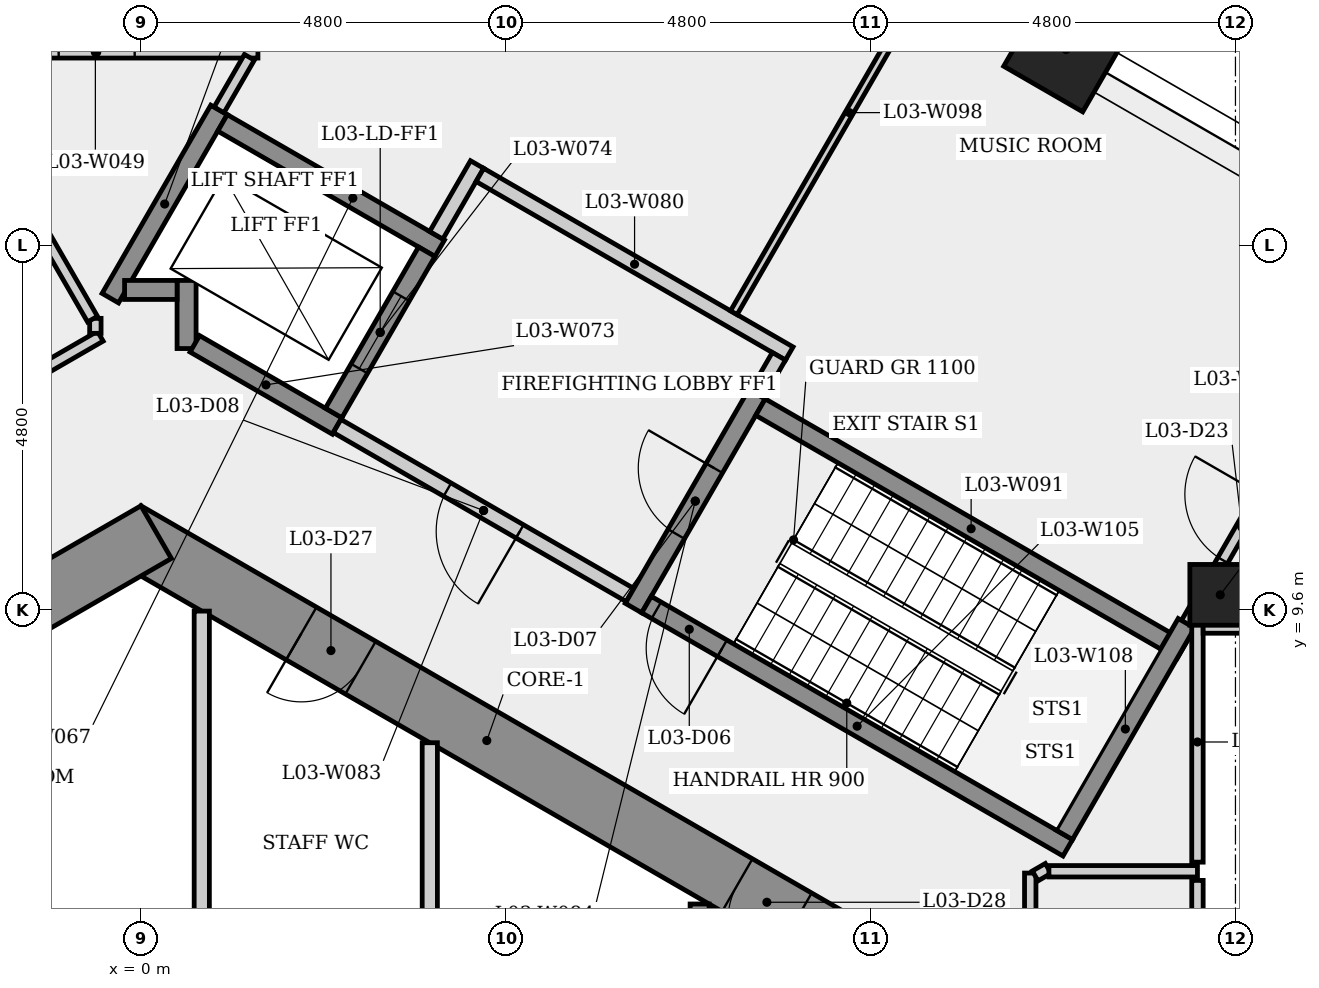
"""IFC4 building model, lengths in metres.
Left out: names, types, materials, properties, quantities, classifications, styles, units other than length and angle.
Written with IfcOpenShell. Run it as: python <this file> out.ifc"""

import sys

from ifc_helpers import new_model, si_unit, direction, frame, frame_2d, origin, origin_2d, place, context, subcontext, project, spatial, rectangle, extrude, element, fill, save


model = new_model("IFC4")
c1 = context("Model", 3, precision=1e-05, world=origin(), true_north=direction((0.0, 1.0)))
c2 = subcontext(c1, "Body", "Model", "MODEL_VIEW")
j1 = project(units=[si_unit("LENGTHUNIT", "METRE"), si_unit("PLANEANGLEUNIT", "RADIAN")], contexts=[c1])
p1 = place(None, origin())
s1 = spatial("IfcSite", under=j1, at=p1, CompositionType="ELEMENT")
p2 = place(p1, origin())
s2 = spatial("IfcBuilding", under=s1, at=p2, CompositionType="ELEMENT")
p3 = place(p2, frame((0.0, 0.0, 16.0)))
s3 = spatial("IfcBuildingStorey", under=s2, at=p3, CompositionType="ELEMENT", Elevation=16.0)
p4 = place(p3, frame((9.3, 5.138, 0.0), z_axis=(0.0, 0.0, 1.0), x_axis=(-0.866023993627, 0.500002442456, 0.0)))
e1 = element("IfcWall", 1, at=p4, inside=s3, PredefinedType="SHEAR", context=c2, shape_type="SweptSolid", body=[
    extrude(rectangle(XDim=10.97, YDim=0.8, at=frame_2d((5.485, 0.0))), origin(), (0.0, 0.0, 1.0), 4.5),
])
p5 = place(p4, frame((7.403, 0.0, 0.0)))
e2 = element("IfcOpeningElement", 2, at=p5, cuts=e1, PredefinedType="OPENING", context=c2, shape_type="SweptSolid", body=[
    extrude(rectangle(XDim=0.9, YDim=2.1, at=frame_2d((0.45, 1.05))), frame((0.0, 0.41, 0.0), z_axis=(0.0, -1.0, 0.0), x_axis=(1.0, 0.0, 0.0)), (0.0, 0.0, 1.0), 0.82),
])
p6 = place(p4, frame((0.78, 0.0, 0.0)))
e3 = element("IfcOpeningElement", 3, at=p6, cuts=e1, PredefinedType="OPENING", context=c2, shape_type="SweptSolid", body=[
    extrude(rectangle(XDim=0.9, YDim=2.1, at=frame_2d((0.45, 1.05))), frame((0.0, 0.41, 0.0), z_axis=(0.0, -1.0, 0.0), x_axis=(1.0, 0.0, 0.0)), (0.0, 0.0, 1.0), 0.82),
])
p7 = place(p3, frame((0.2, 10.623, 0.0), z_axis=(0.0, 0.0, 1.0), x_axis=(-0.866023993627, -0.500002442456, 0.0)))
e4 = element("IfcWall", 4, at=p7, inside=s3, PredefinedType="SHEAR", context=c2, shape_type="SweptSolid", body=[
    extrude(rectangle(XDim=10.97, YDim=0.8, at=frame_2d((5.485, 0.0))), origin(), (0.0, 0.0, 1.0), 4.5),
])
p8 = place(p7, frame((6.185, 0.0, 0.0)))
e5 = element("IfcOpeningElement", 5, at=p8, cuts=e4, PredefinedType="OPENING", context=c2, shape_type="SweptSolid", body=[
    extrude(rectangle(XDim=0.9, YDim=2.1, at=frame_2d((0.45, 1.05))), frame((0.0, 0.41, 0.0), z_axis=(0.0, -1.0, 0.0), x_axis=(1.0, 0.0, 0.0)), (0.0, 0.0, 1.0), 0.82),
])
p9 = place(p3, frame((12.171, 16.973, 0.0), z_axis=(0.0, 0.0, 1.0), x_axis=(0.5, 0.866025403784, 0.0)))
e6 = element("IfcColumn", 6, at=p9, inside=s3, PredefinedType="COLUMN", context=c2, shape_type="SweptSolid", body=[
    extrude(rectangle(XDim=1.2, YDim=1.2, at=origin_2d()), origin(), (0.0, 0.0, 1.0), 4.5),
])
p10 = place(p3, frame((14.2, 9.798, 0.0), z_axis=(0.0, 0.0, 1.0), x_axis=(1.0, 0.0, 0.0)))
e7 = element("IfcColumn", 7, at=p10, inside=s3, PredefinedType="COLUMN", context=c2, shape_type="SweptSolid", body=[
    extrude(rectangle(XDim=0.8, YDim=0.8, at=origin_2d()), origin(), (0.0, 0.0, 1.0), 4.05),
])
p11 = place(p3, frame((-10.598, 7.391, 0.0), z_axis=(0.0, 0.0, 1.0), x_axis=(0.866022183431, 0.500005577774, 0.0)))
e8 = element("IfcWall", 8, at=p11, inside=s3, PredefinedType="PARTITIONING", context=c2, shape_type="SweptSolid", body=[
    extrude(rectangle(XDim=11.619, YDim=0.15, at=frame_2d((5.81, 0.0))), origin(), (0.0, 0.0, 1.0), 4.05),
])
p12 = place(p11, frame((5.272, 0.0, 0.0)))
e9 = element("IfcOpeningElement", 9, at=p12, cuts=e8, PredefinedType="OPENING", context=c2, shape_type="SweptSolid", body=[
    extrude(rectangle(XDim=1.0, YDim=2.1, at=frame_2d((0.5, 1.05))), frame((0.0, 0.085, 0.0), z_axis=(0.0, -1.0, 0.0), x_axis=(1.0, 0.0, 0.0)), (0.0, 0.0, 1.0), 0.17),
])
p13 = place(p3, frame((-2.739, 16.936, 0.0), z_axis=(0.0, 0.0, 1.0), x_axis=(1.0, 0.0, 0.0)))
e10 = element("IfcWall", 10, at=p13, inside=s3, PredefinedType="PARTITIONING", context=c2, shape_type="SweptSolid", body=[
    extrude(rectangle(XDim=4.278, YDim=0.15, at=frame_2d((2.139, 0.0))), origin(), (0.0, 0.0, 1.0), 4.05),
])
p14 = place(p13, frame((1.656, 0.0, 0.0)))
e11 = element("IfcOpeningElement", 11, at=p14, cuts=e10, PredefinedType="OPENING", context=c2, shape_type="SweptSolid", body=[
    extrude(rectangle(XDim=1.0, YDim=2.1, at=frame_2d((0.5, 1.05))), frame((0.0, 0.085, 0.0), z_axis=(0.0, -1.0, 0.0), x_axis=(1.0, 0.0, 0.0)), (0.0, 0.0, 1.0), 0.17),
])
p15 = place(p3, frame((-0.6, 13.239, 0.0), z_axis=(0.0, 0.0, 1.0), x_axis=(0.0, 1.0, 0.0)))
e12 = element("IfcWall", 12, at=p15, inside=s3, PredefinedType="PARTITIONING", context=c2, shape_type="SweptSolid", body=[
    extrude(rectangle(XDim=0.197, YDim=0.15, at=frame_2d((0.099, 0.0))), origin(), (0.0, 0.0, 1.0), 4.05),
])
p16 = place(p3, frame((-0.637, 13.426, 0.0), z_axis=(0.0, 0.0, 1.0), x_axis=(-0.500046503579, 0.865998553266, 0.0)))
e13 = element("IfcWall", 13, at=p16, inside=s3, PredefinedType="PARTITIONING", context=c2, shape_type="SweptSolid", body=[
    extrude(rectangle(XDim=3.978, YDim=0.15, at=frame_2d((1.989, 0.0))), origin(), (0.0, 0.0, 1.0), 4.05),
])
p17 = place(p3, frame((-0.403, 13.702, 0.0), z_axis=(0.0, 0.0, 1.0), x_axis=(0.499976111731, 0.866039195244, 0.0)))
e14 = element("IfcWall", 14, at=p17, inside=s3, PredefinedType="SHEAR", context=c2, shape_type="SweptSolid", body=[
    extrude(rectangle(XDim=2.861, YDim=0.25, at=frame_2d((1.43, 0.0))), origin(), (0.0, 0.0, 1.0), 4.05),
])
p18 = place(p3, frame((0.6, 13.039, 0.0), z_axis=(0.0, 0.0, 1.0), x_axis=(0.0, 1.0, 0.0)))
e15 = element("IfcWall", 15, at=p18, inside=s3, PredefinedType="SHEAR", context=c2, shape_type="SweptSolid", body=[
    extrude(rectangle(XDim=0.896, YDim=0.25, at=frame_2d((0.448, 0.0))), origin(), (0.0, 0.0, 1.0), 4.05),
])
p19 = place(p3, frame((0.475, 13.81, 0.0), z_axis=(0.0, 0.0, 1.0), x_axis=(-1.0, 0.0, 0.0)))
e16 = element("IfcWall", 16, at=p19, inside=s3, PredefinedType="SHEAR", context=c2, shape_type="SweptSolid", body=[
    extrude(rectangle(XDim=0.691, YDim=0.25, at=frame_2d((0.345, 0.0))), origin(), (0.0, 0.0, 1.0), 4.5),
])
p20 = place(p3, frame((0.8, 9.584, 0.0), z_axis=(0.0, 0.0, 1.0), x_axis=(0.0, -1.0, 0.0)))
e17 = element("IfcWall", 17, at=p20, inside=s3, PredefinedType="PARTITIONING", context=c2, shape_type="SweptSolid", body=[
    extrude(rectangle(XDim=4.309, YDim=0.2, at=frame_2d((2.155, 0.0))), origin(), (0.0, 0.0, 1.0), 4.05),
])
p21 = place(p3, frame((1.073, 16.008, 0.0), z_axis=(0.0, 0.0, 1.0), x_axis=(0.866040211805, -0.499974350878, 0.0)))
e18 = element("IfcWall", 18, at=p21, inside=s3, PredefinedType="SHEAR", context=c2, shape_type="SweptSolid", body=[
    extrude(rectangle(XDim=3.3, YDim=0.25, at=frame_2d((1.65, 0.0))), origin(), (0.0, 0.0, 1.0), 4.05),
])
p22 = place(p3, frame((1.427, 16.871, 0.0), z_axis=(0.0, 0.0, 1.0), x_axis=(-0.499951716245, -0.866053278629, 0.0)))
e19 = element("IfcWall", 19, at=p22, inside=s3, PredefinedType="PARTITIONING", context=c2, shape_type="SweptSolid", body=[
    extrude(rectangle(XDim=0.799, YDim=0.15, at=frame_2d((0.399, 0.0))), origin(), (0.0, 0.0, 1.0), 4.05),
])
p23 = place(p3, frame((2.581, 12.02, 0.0), z_axis=(0.0, 0.0, 1.0), x_axis=(-0.86603892542, 0.499976579108, 0.0)))
e20 = element("IfcWall", 20, at=p23, inside=s3, PredefinedType="SHEAR", context=c2, shape_type="SweptSolid", body=[
    extrude(rectangle(XDim=2.162, YDim=0.25, at=frame_2d((1.081, 0.0))), origin(), (0.0, 0.0, 1.0), 4.05),
])
p24 = place(p3, frame((2.535, 12.191, 0.0), z_axis=(0.0, 0.0, 1.0), x_axis=(0.500061746146, 0.865989751695, 0.0)))
e21 = element("IfcWall", 21, at=p24, inside=s3, PredefinedType="SHEAR", context=c2, shape_type="SweptSolid", body=[
    extrude(rectangle(XDim=2.45, YDim=0.25, at=frame_2d((1.225, 0.0))), origin(), (0.0, 0.0, 1.0), 4.5),
])
p25 = place(p24, frame((0.675, 0.0, 0.0)))
e22 = element("IfcOpeningElement", 22, at=p25, cuts=e21, PredefinedType="OPENING", context=c2, shape_type="SweptSolid", body=[
    extrude(rectangle(XDim=1.1, YDim=2.1, at=frame_2d((0.55, 1.05))), frame((0.0, 0.135, 0.0), z_axis=(0.0, -1.0, 0.0), x_axis=(1.0, 0.0, 0.0)), (0.0, 0.0, 1.0), 0.27),
])
p26 = place(p3, frame((3.8, 7.852, 0.0), z_axis=(0.0, 0.0, 1.0), x_axis=(0.0, -1.0, 0.0)))
e23 = element("IfcWall", 23, at=p26, inside=s3, PredefinedType="PARTITIONING", context=c2, shape_type="SweptSolid", body=[
    extrude(rectangle(XDim=2.577, YDim=0.2, at=frame_2d((1.289, 0.0))), origin(), (0.0, 0.0, 1.0), 4.05),
])
p27 = place(p3, frame((3.885, 14.529, 0.0), z_axis=(0.0, 0.0, 1.0), x_axis=(0.499997628298, 0.866026773083, 0.0)))
e24 = element("IfcWall", 24, at=p27, inside=s3, PredefinedType="PARTITIONING", context=c2, shape_type="SweptSolid", body=[
    extrude(rectangle(XDim=1.075, YDim=0.2, at=frame_2d((0.538, 0.0))), origin(), (0.0, 0.0, 1.0), 4.05),
])
p28 = place(p3, frame((4.459, 15.323, 0.0), z_axis=(0.0, 0.0, 1.0), x_axis=(0.866016039709, -0.500016218704, 0.0)))
e25 = element("IfcWall", 25, at=p28, inside=s3, PredefinedType="PARTITIONING", context=c2, shape_type="SweptSolid", body=[
    extrude(rectangle(XDim=4.7, YDim=0.2, at=frame_2d((2.35, 0.0))), origin(), (0.0, 0.0, 1.0), 4.05),
])
p29 = place(p3, frame((6.435, 9.795, 0.0), z_axis=(0.0, 0.0, 1.0), x_axis=(-0.866012907634, 0.500021643343, 0.0)))
e26 = element("IfcWall", 26, at=p29, inside=s3, PredefinedType="PARTITIONING", context=c2, shape_type="SweptSolid", body=[
    extrude(rectangle(XDim=4.45, YDim=0.2, at=frame_2d((2.225, 0.0))), origin(), (0.0, 0.0, 1.0), 4.05),
])
p30 = place(p29, frame((1.675, 0.0, 0.0)))
e27 = element("IfcOpeningElement", 27, at=p30, cuts=e26, PredefinedType="OPENING", context=c2, shape_type="SweptSolid", body=[
    extrude(rectangle(XDim=1.1, YDim=2.1, at=frame_2d((0.55, 1.05))), frame((0.0, 0.11, 0.0), z_axis=(0.0, -1.0, 0.0), x_axis=(1.0, 0.0, 0.0)), (0.0, 0.0, 1.0), 0.22),
])
p31 = place(p3, frame((6.48, 9.624, 0.0), z_axis=(0.0, 0.0, 1.0), x_axis=(0.500017246033, 0.866015446554, 0.0)))
e28 = element("IfcWall", 28, at=p31, inside=s3, PredefinedType="SHEAR", context=c2, shape_type="SweptSolid", body=[
    extrude(rectangle(XDim=3.25, YDim=0.25, at=frame_2d((1.625, 0.0))), origin(), (0.0, 0.0, 1.0), 4.05),
])
p32 = place(p31, frame((1.125, 0.0, 0.0)))
e29 = element("IfcOpeningElement", 29, at=p32, cuts=e28, PredefinedType="OPENING", context=c2, shape_type="SweptSolid", body=[
    extrude(rectangle(XDim=1.0, YDim=2.1, at=frame_2d((0.5, 1.05))), frame((0.0, 0.135, 0.0), z_axis=(0.0, -1.0, 0.0), x_axis=(1.0, 0.0, 0.0)), (0.0, 0.0, 1.0), 0.27),
])
p33 = place(p3, frame((7.35, 5.73, 0.0), z_axis=(0.0, 0.0, 1.0), x_axis=(0.0, -1.0, 0.0)))
e30 = element("IfcWall", 30, at=p33, inside=s3, PredefinedType="SHEAR", context=c2, shape_type="SweptSolid", body=[
    extrude(rectangle(XDim=3.805, YDim=0.25, at=frame_2d((1.903, 0.0))), origin(), (0.0, 0.0, 1.0), 4.05),
])
p34 = place(p3, frame((8.151, 12.268, 0.0), z_axis=(0.0, 0.0, 1.0), x_axis=(0.866025499775, -0.499999833739, 0.0)))
e31 = element("IfcWall", 31, at=p34, inside=s3, PredefinedType="SHEAR", context=c2, shape_type="SweptSolid", body=[
    extrude(rectangle(XDim=6.4, YDim=0.25, at=frame_2d((3.2, 0.0))), origin(), (0.0, 0.0, 1.0), 4.05),
])
p35 = place(p3, frame((8.393, 12.937, 0.0), z_axis=(0.0, 0.0, 1.0), x_axis=(-0.500065409566, -0.86598763626, 0.0)))
e32 = element("IfcWall", 32, at=p35, inside=s3, PredefinedType="PARTITIONING", context=c2, shape_type="SweptSolid", body=[
    extrude(rectangle(XDim=0.575, YDim=0.2, at=frame_2d((0.288, 0.0))), origin(), (0.0, 0.0, 1.0), 4.05),
])
p36 = place(p3, frame((10.84, 18.776, 0.0), z_axis=(0.0, 0.0, 1.0), x_axis=(-0.500003976293, -0.866023108059, 0.0)))
e33 = element("IfcWall", 33, at=p36, inside=s3, PredefinedType="PARTITIONING", context=c2, shape_type="SweptSolid", body=[
    extrude(rectangle(XDim=6.081, YDim=0.1, at=frame_2d((3.04, 0.0))), origin(), (0.0, 0.0, 1.0), 4.05),
])
p37 = place(p3, frame((11.7, 6.137, 0.0), z_axis=(0.0, 0.0, 1.0), x_axis=(0.0, -1.0, 0.0)))
e34 = element("IfcWall", 34, at=p37, inside=s3, PredefinedType="PARTITIONING", context=c2, shape_type="SweptSolid", body=[
    extrude(rectangle(XDim=12.125, YDim=0.15, at=frame_2d((6.062, 0.0))), origin(), (0.0, 0.0, 1.0), 4.05),
])
p38 = place(p37, frame((5.6, 0.0, 0.0)))
e35 = element("IfcOpeningElement", 35, at=p38, cuts=e34, PredefinedType="OPENING", context=c2, shape_type="SweptSolid", body=[
    extrude(rectangle(XDim=1.0, YDim=2.1, at=frame_2d((0.5, 1.05))), frame((0.0, 0.085, 0.0), z_axis=(0.0, -1.0, 0.0), x_axis=(1.0, 0.0, 0.0)), (0.0, 0.0, 1.0), 0.17),
])
p39 = place(p3, frame((11.936, 6.198, 0.0), z_axis=(0.0, 0.0, 1.0), x_axis=(-0.866103179807, -0.499865263774, 0.0)))
e36 = element("IfcWall", 36, at=p39, inside=s3, PredefinedType="PARTITIONING", context=c2, shape_type="SweptSolid", body=[
    extrude(rectangle(XDim=0.197, YDim=0.15, at=frame_2d((0.099, 0.0))), origin(), (0.0, 0.0, 1.0), 4.05),
])
p40 = place(p3, frame((12.194, 6.47, 0.0), z_axis=(0.0, 0.0, 1.0), x_axis=(-0.866025499775, 0.499999833739, 0.0)))
e37 = element("IfcWall", 37, at=p40, inside=s3, PredefinedType="SHEAR", context=c2, shape_type="SweptSolid", body=[
    extrude(rectangle(XDim=6.4, YDim=0.25, at=frame_2d((3.2, 0.0))), origin(), (0.0, 0.0, 1.0), 4.05),
])
p41 = place(p40, frame((5.25, 0.0, 0.0)))
e38 = element("IfcOpeningElement", 38, at=p41, cuts=e37, PredefinedType="OPENING", context=c2, shape_type="SweptSolid", body=[
    extrude(rectangle(XDim=1.0, YDim=2.1, at=frame_2d((0.5, 1.05))), frame((0.0, 0.135, 0.0), z_axis=(0.0, -1.0, 0.0), x_axis=(1.0, 0.0, 0.0)), (0.0, 0.0, 1.0), 0.27),
])
p42 = place(p3, frame((13.648, 9.239, 0.0), z_axis=(0.0, 0.0, 1.0), x_axis=(0.500000491645, 0.866025119933, 0.0)))
e39 = element("IfcWall", 39, at=p42, inside=s3, PredefinedType="PARTITIONING", context=c2, shape_type="SweptSolid", body=[
    extrude(rectangle(XDim=3.42, YDim=0.15, at=frame_2d((1.71, 0.0))), origin(), (0.0, 0.0, 1.0), 4.05),
])
p43 = place(p42, frame((1.173, 0.0, 0.0)))
e40 = element("IfcOpeningElement", 40, at=p43, cuts=e39, PredefinedType="OPENING", context=c2, shape_type="SweptSolid", body=[
    extrude(rectangle(XDim=1.0, YDim=2.1, at=frame_2d((0.5, 1.05))), frame((0.0, 0.085, 0.0), z_axis=(0.0, -1.0, 0.0), x_axis=(1.0, 0.0, 0.0)), (0.0, 0.0, 1.0), 0.17),
])
p44 = place(p3, frame((13.755, 9.424, 0.0), z_axis=(0.0, 0.0, 1.0), x_axis=(-0.500011789842, -0.866018596809, 0.0)))
e41 = element("IfcWall", 41, at=p44, inside=s3, PredefinedType="SHEAR", context=c2, shape_type="SweptSolid", body=[
    extrude(rectangle(XDim=3.214, YDim=0.25, at=frame_2d((1.607, 0.0))), origin(), (0.0, 0.0, 1.0), 4.05),
])
p45 = place(p3, frame((13.9, 6.041, 0.0), z_axis=(0.0, 0.0, 1.0), x_axis=(0.0, -1.0, 0.0)))
e42 = element("IfcWall", 42, at=p45, inside=s3, PredefinedType="PARTITIONING", context=c2, shape_type="SweptSolid", body=[
    extrude(rectangle(XDim=12.082, YDim=0.15, at=frame_2d((6.041, 0.0))), origin(), (0.0, 0.0, 1.0), 4.05),
])
p46 = place(p3, frame((13.9, 6.161, 0.0), z_axis=(0.0, 0.0, 1.0), x_axis=(-1.0, 0.0, 0.0)))
e43 = element("IfcWall", 43, at=p46, inside=s3, PredefinedType="PARTITIONING", context=c2, shape_type="SweptSolid", body=[
    extrude(rectangle(XDim=1.954, YDim=0.15, at=frame_2d((0.977, 0.0))), origin(), (0.0, 0.0, 1.0), 4.05),
])
p47 = place(p3, frame((13.9, 9.443, 0.0), z_axis=(0.0, 0.0, 1.0), x_axis=(0.0, -1.0, 0.0)))
e44 = element("IfcWall", 44, at=p47, inside=s3, PredefinedType="PARTITIONING", context=c2, shape_type="SweptSolid", body=[
    extrude(rectangle(XDim=3.162, YDim=0.15, at=frame_2d((1.581, 0.0))), origin(), (0.0, 0.0, 1.0), 4.05),
])
p48 = place(p3, frame((16.78, 9.368, 0.0), z_axis=(0.0, 0.0, 1.0), x_axis=(-1.0, 0.0, 0.0)))
e45 = element("IfcWall", 45, at=p48, inside=s3, PredefinedType="PARTITIONING", context=c2, shape_type="SweptSolid", body=[
    extrude(rectangle(XDim=2.805, YDim=0.15, at=frame_2d((1.402, 0.0))), origin(), (0.0, 0.0, 1.0), 4.05),
])
p49 = place(p41, origin())
e46 = element("IfcDoor", 46, at=p49, inside=s3, OperationType="SINGLE_SWING_LEFT", PredefinedType="DOOR", context=c2, shape_type="SweptSolid", body=[
    extrude(rectangle(XDim=1.0, YDim=2.1, at=frame_2d((0.5, 1.05))), frame((0.0, 0.025, 0.0), z_axis=(0.0, -1.0, 0.0), x_axis=(1.0, 0.0, 0.0)), (0.0, 0.0, 1.0), 0.05),
])
fill(e38, e46)
p50 = place(p32, origin())
e47 = element("IfcDoor", 47, at=p50, inside=s3, OperationType="SINGLE_SWING_RIGHT", PredefinedType="DOOR", context=c2, shape_type="SweptSolid", body=[
    extrude(rectangle(XDim=1.0, YDim=2.1, at=frame_2d((0.5, 1.05))), frame((0.0, 0.025, 0.0), z_axis=(0.0, -1.0, 0.0), x_axis=(1.0, 0.0, 0.0)), (0.0, 0.0, 1.0), 0.05),
])
fill(e29, e47)
p51 = place(p30, origin())
e48 = element("IfcDoor", 48, at=p51, inside=s3, OperationType="SINGLE_SWING_LEFT", PredefinedType="DOOR", context=c2, shape_type="SweptSolid", body=[
    extrude(rectangle(XDim=1.1, YDim=2.1, at=frame_2d((0.55, 1.05))), frame((0.0, 0.025, 0.0), z_axis=(0.0, -1.0, 0.0), x_axis=(1.0, 0.0, 0.0)), (0.0, 0.0, 1.0), 0.05),
])
fill(e27, e48)
p52 = place(p25, origin())
e49 = element("IfcDoor", 49, at=p52, inside=s3, OperationType="SLIDING_TO_LEFT", PredefinedType="DOOR", context=c2, shape_type="SweptSolid", body=[
    extrude(rectangle(XDim=1.1, YDim=2.1, at=frame_2d((0.55, 1.05))), frame((0.0, 0.025, 0.0), z_axis=(0.0, -1.0, 0.0), x_axis=(1.0, 0.0, 0.0)), (0.0, 0.0, 1.0), 0.05),
])
fill(e22, e49)
p53 = place(p14, origin())
e50 = element("IfcDoor", 50, at=p53, inside=s3, OperationType="SINGLE_SWING_LEFT", PredefinedType="DOOR", context=c2, shape_type="SweptSolid", body=[
    extrude(rectangle(XDim=1.0, YDim=2.1, at=frame_2d((0.5, 1.05))), frame((0.0, 0.025, 0.0), z_axis=(0.0, -1.0, 0.0), x_axis=(1.0, 0.0, 0.0)), (0.0, 0.0, 1.0), 0.05),
])
fill(e11, e50)
p54 = place(p43, origin())
e51 = element("IfcDoor", 51, at=p54, inside=s3, OperationType="SINGLE_SWING_RIGHT", PredefinedType="DOOR", context=c2, shape_type="SweptSolid", body=[
    extrude(rectangle(XDim=1.0, YDim=2.1, at=frame_2d((0.5, 1.05))), frame((0.0, 0.025, 0.0), z_axis=(0.0, -1.0, 0.0), x_axis=(1.0, 0.0, 0.0)), (0.0, 0.0, 1.0), 0.05),
])
fill(e40, e51)
p55 = place(p5, origin())
e52 = element("IfcDoor", 52, at=p55, inside=s3, OperationType="SINGLE_SWING_RIGHT", PredefinedType="DOOR", context=c2, shape_type="SweptSolid", body=[
    extrude(rectangle(XDim=0.9, YDim=2.1, at=frame_2d((0.45, 1.05))), frame((0.0, 0.025, 0.0), z_axis=(0.0, -1.0, 0.0), x_axis=(1.0, 0.0, 0.0)), (0.0, 0.0, 1.0), 0.05),
])
fill(e2, e52)
p56 = place(p6, origin())
e53 = element("IfcDoor", 53, at=p56, inside=s3, OperationType="SINGLE_SWING_LEFT", PredefinedType="DOOR", context=c2, shape_type="SweptSolid", body=[
    extrude(rectangle(XDim=0.9, YDim=2.1, at=frame_2d((0.45, 1.05))), frame((0.0, 0.025, 0.0), z_axis=(0.0, -1.0, 0.0), x_axis=(1.0, 0.0, 0.0)), (0.0, 0.0, 1.0), 0.05),
])
fill(e3, e53)
save(model, sys.argv[1])
